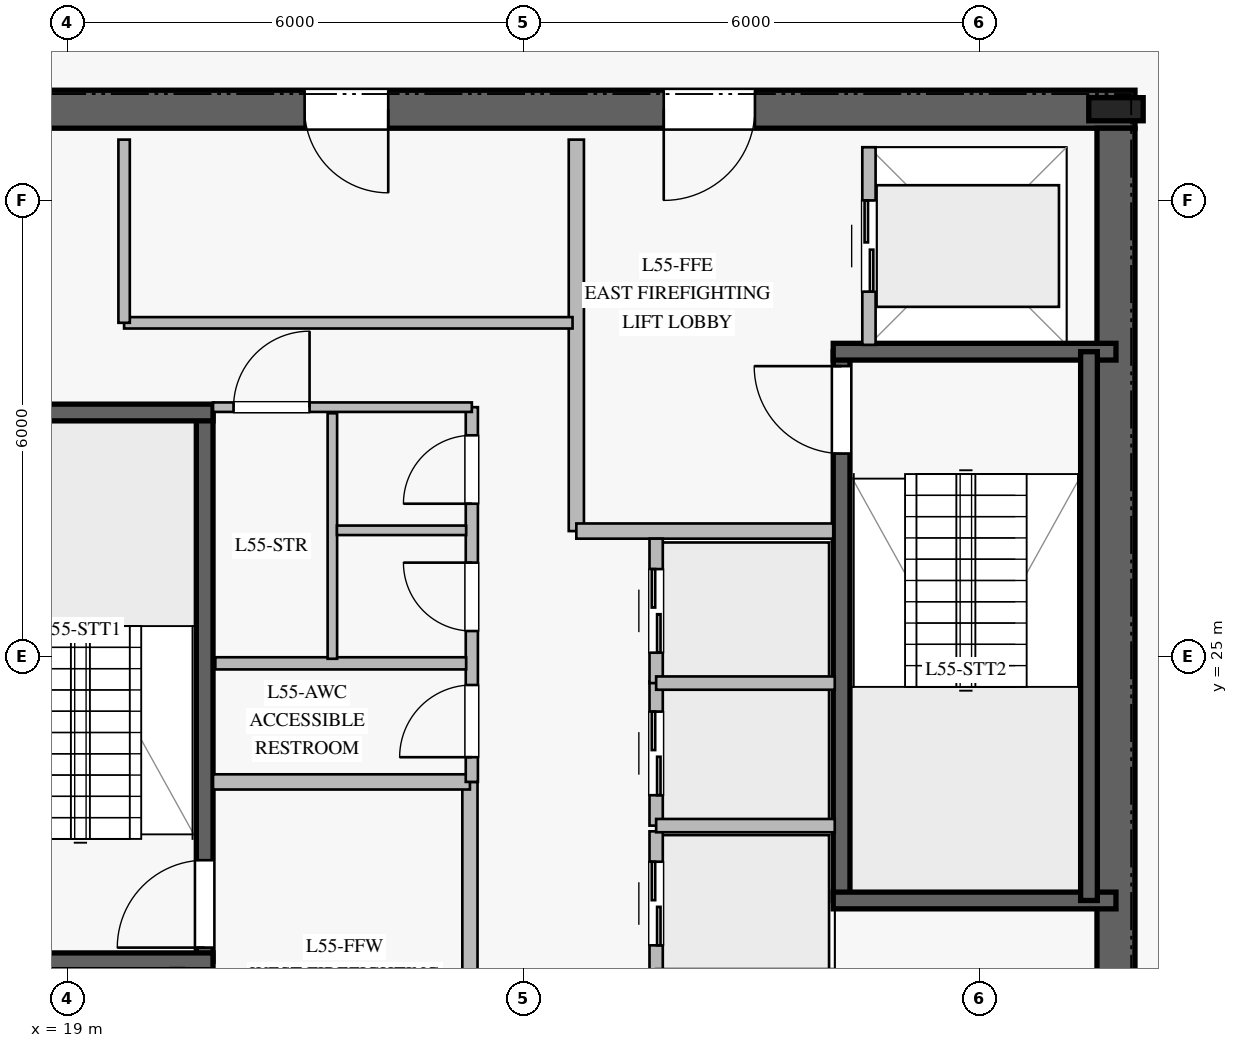
"""IFC4 building model, lengths in metres.
Left out: names, types, materials, properties, quantities, classifications, styles, units other than length and angle.
Written with IfcOpenShell. Run it as: python <this file> out.ifc"""

import sys

from ifc_helpers import new_model, si_unit, direction, frame, frame_2d, origin, origin_2d, place, context, subcontext, project, spatial, rectangle, i_section, extrude, element, fill, save


model = new_model("IFC4")
c1 = context("Model", 3, precision=1e-05, world=origin(), true_north=direction((0.0, 1.0)))
c2 = subcontext(c1, "Body", "Model", "MODEL_VIEW")
j1 = project(units=[si_unit("LENGTHUNIT", "METRE"), si_unit("PLANEANGLEUNIT", "RADIAN")], contexts=[c1])
p1 = place(None, origin())
s1 = spatial("IfcSite", under=j1, at=p1, CompositionType="ELEMENT")
p2 = place(p1, origin())
s2 = spatial("IfcBuilding", under=s1, at=p2, CompositionType="ELEMENT")
p3 = place(p2, frame((0.0, 0.0, 228.8)))
s3 = spatial("IfcBuildingStorey", under=s2, at=p3, CompositionType="ELEMENT", Elevation=228.8)
p4 = place(p3, frame((33.05, 32.2, 0.0), z_axis=(0.0, 0.0, 1.0), x_axis=(-1.0, 0.0, 0.0)))
e1 = element("IfcWall", 1, at=p4, inside=s3, PredefinedType="SHEAR", context=c2, shape_type="SweptSolid", body=[
    extrude(rectangle(XDim=16.1, YDim=0.5, at=frame_2d((8.05, 0.0))), origin(), (0.0, 0.0, 1.0), 3.78),
])
p5 = place(p4, frame((5.0, 0.0, 0.0)))
e2 = element("IfcOpeningElement", 2, at=p5, cuts=e1, PredefinedType="OPENING", context=c2, shape_type="SweptSolid", body=[
    extrude(rectangle(XDim=1.2, YDim=2.25, at=frame_2d((0.6, 1.125))), frame((0.0, 0.26, 0.0), z_axis=(0.0, -1.0, 0.0), x_axis=(1.0, 0.0, 0.0)), (0.0, 0.0, 1.0), 0.52),
])
p6 = place(p4, frame((9.825, 0.0, 0.0)))
e3 = element("IfcOpeningElement", 3, at=p6, cuts=e1, PredefinedType="OPENING", context=c2, shape_type="SweptSolid", body=[
    extrude(rectangle(XDim=1.1, YDim=2.2, at=frame_2d((0.55, 1.1))), frame((0.0, 0.26, 0.0), z_axis=(0.0, -1.0, 0.0), x_axis=(1.0, 0.0, 0.0)), (0.0, 0.0, 1.0), 0.52),
])
p7 = place(p3, frame((32.8, 18.05, 0.0), z_axis=(0.0, 0.0, 1.0), x_axis=(0.0, 1.0, 0.0)))
e4 = element("IfcWall", 4, at=p7, inside=s3, PredefinedType="SHEAR", context=c2, shape_type="SweptSolid", body=[
    extrude(rectangle(XDim=13.9, YDim=0.5, at=frame_2d((6.95, 0.0))), origin(), (0.0, 0.0, 1.0), 3.78),
])
p8 = place(p3, frame((32.8, 32.2, 0.0), z_axis=(0.0, 0.0, 1.0), x_axis=(1.0, 0.0, 0.0)))
e5 = element("IfcColumn", 5, at=p8, inside=s3, PredefinedType="COLUMN", context=c2, shape_type="SweptSolid", body=[
    extrude(i_section(OverallWidth=0.304, OverallDepth=0.716, WebThickness=0.021, FlangeThickness=0.04, at=origin_2d()), origin(), (0.0, 0.0, 1.0), 4.0),
])
p9 = place(p3, frame((20.81, 20.99, 0.0), z_axis=(0.0, 0.0, 1.0), x_axis=(0.0, 1.0, 0.0)))
e6 = element("IfcWall", 6, at=p9, inside=s3, PredefinedType="SOLIDWALL", context=c2, shape_type="SweptSolid", body=[
    extrude(rectangle(XDim=7.22, YDim=0.22, at=frame_2d((3.61, 0.0))), origin(), (0.0, 0.0, 1.0), 3.78),
])
p10 = place(p9, frame((0.18, 0.0, 0.0)))
e7 = element("IfcOpeningElement", 7, at=p10, cuts=e6, PredefinedType="OPENING", context=c2, shape_type="SweptSolid", body=[
    extrude(rectangle(XDim=1.15, YDim=2.2, at=frame_2d((0.575, 1.1))), frame((0.0, 0.12, 0.0), z_axis=(0.0, -1.0, 0.0), x_axis=(1.0, 0.0, 0.0)), (0.0, 0.0, 1.0), 0.24),
])
for number, where, z_axis, x_axis in (
    (8, (17.2, 20.99, 0.0), (0.0, 0.0, 1.0), (1.0, 0.0, 0.0)),
    (9, (17.2, 28.21, 0.0), (0.0, 0.0, 1.0), (1.0, 0.0, 0.0)),
):
    element("IfcWall", number, at=place(p3, frame(where, z_axis=z_axis, x_axis=x_axis)), inside=s3, PredefinedType="SOLIDWALL", context=c2, shape_type="SweptSolid", body=[
        extrude(rectangle(XDim=3.72, YDim=0.22, at=frame_2d((1.86, 0.0))), origin(), (0.0, 0.0, 1.0), 3.78),
    ])
p11 = place(p3, frame((29.19, 21.79, 0.0), z_axis=(0.0, 0.0, 1.0), x_axis=(0.0, 1.0, 0.0)))
e10 = element("IfcWall", 10, at=p11, inside=s3, PredefinedType="SOLIDWALL", context=c2, shape_type="SweptSolid", body=[
    extrude(rectangle(XDim=7.22, YDim=0.22, at=frame_2d((3.61, 0.0))), origin(), (0.0, 0.0, 1.0), 3.78),
])
p12 = place(p11, frame((5.88, 0.0, 0.0)))
e11 = element("IfcOpeningElement", 11, at=p12, cuts=e10, PredefinedType="OPENING", context=c2, shape_type="SweptSolid", body=[
    extrude(rectangle(XDim=1.15, YDim=2.2, at=frame_2d((0.575, 1.1))), frame((0.0, 0.12, 0.0), z_axis=(0.0, -1.0, 0.0), x_axis=(1.0, 0.0, 0.0)), (0.0, 0.0, 1.0), 0.24),
])
for number, where, z_axis, x_axis in (
    (12, (29.08, 21.79, 0.0), (0.0, 0.0, 1.0), (1.0, 0.0, 0.0)),
    (13, (29.08, 29.01, 0.0), (0.0, 0.0, 1.0), (1.0, 0.0, 0.0)),
):
    element("IfcWall", number, at=place(p3, frame(where, z_axis=z_axis, x_axis=x_axis)), inside=s3, PredefinedType="SOLIDWALL", context=c2, shape_type="SweptSolid", body=[
        extrude(rectangle(XDim=3.72, YDim=0.22, at=frame_2d((1.86, 0.0))), origin(), (0.0, 0.0, 1.0), 3.78),
    ])
p13 = place(p3, frame((32.445, 29.01, 0.0), z_axis=(0.0, 0.0, 1.0), x_axis=(0.0, -1.0, 0.0)))
e14 = element("IfcWall", 14, at=p13, inside=s3, PredefinedType="SOLIDWALL", context=c2, shape_type="SweptSolid", body=[
    extrude(rectangle(XDim=7.22, YDim=0.22, at=frame_2d((3.61, 0.0))), origin(), (0.0, 0.0, 1.0), 3.78),
])
p14 = place(p3, frame((24.3, 18.2, 0.0), z_axis=(0.0, 0.0, 1.0), x_axis=(0.0, 1.0, 0.0)))
e15 = element("IfcWall", 15, at=p14, inside=s3, PredefinedType="PARTITIONING", context=c2, shape_type="SweptSolid", body=[
    extrude(rectangle(XDim=5.15, YDim=0.2, at=frame_2d((2.575, 0.0))), origin(), (0.0, 0.0, 1.0), 3.78),
])
p15 = place(p3, frame((20.92, 23.35, 0.0), z_axis=(0.0, 0.0, 1.0), x_axis=(1.0, 0.0, 0.0)))
e16 = element("IfcWall", 16, at=p15, inside=s3, PredefinedType="PARTITIONING", context=c2, shape_type="SweptSolid", body=[
    extrude(rectangle(XDim=3.38, YDim=0.2, at=frame_2d((1.69, 0.0))), origin(), (0.0, 0.0, 1.0), 3.78),
])
p16 = place(p3, frame((25.7, 26.65, 0.0), z_axis=(0.0, 0.0, 1.0), x_axis=(0.0, 1.0, 0.0)))
e17 = element("IfcWall", 17, at=p16, inside=s3, PredefinedType="PARTITIONING", context=c2, shape_type="SweptSolid", body=[
    extrude(rectangle(XDim=5.15, YDim=0.2, at=frame_2d((2.575, 0.0))), origin(), (0.0, 0.0, 1.0), 3.78),
])
p17 = place(p3, frame((25.7, 26.65, 0.0), z_axis=(0.0, 0.0, 1.0), x_axis=(1.0, 0.0, 0.0)))
e18 = element("IfcWall", 18, at=p17, inside=s3, PredefinedType="PARTITIONING", context=c2, shape_type="SweptSolid", body=[
    extrude(rectangle(XDim=3.38, YDim=0.2, at=frame_2d((1.69, 0.0))), origin(), (0.0, 0.0, 1.0), 3.78),
])
p18 = place(p3, frame((24.325, 23.35, 0.0), z_axis=(0.0, 0.0, 1.0), x_axis=(0.0, 1.0, 0.0)))
e19 = element("IfcWall", 19, at=p18, inside=s3, PredefinedType="PLUMBINGWALL", context=c2, shape_type="SweptSolid", body=[
    extrude(rectangle(XDim=4.93, YDim=0.16, at=frame_2d((2.465, 0.0))), origin(), (0.0, 0.0, 1.0), 3.78),
])
p19 = place(p18, frame((0.325, 0.0, 0.0)))
e20 = element("IfcOpeningElement", 20, at=p19, cuts=e19, PredefinedType="OPENING", context=c2, shape_type="SweptSolid", body=[
    extrude(rectangle(XDim=0.95, YDim=2.1, at=frame_2d((0.475, 1.05))), frame((0.0, 0.09, 0.0), z_axis=(0.0, -1.0, 0.0), x_axis=(1.0, 0.0, 0.0)), (0.0, 0.0, 1.0), 0.18),
])
p20 = place(p18, frame((1.985, 0.0, 0.0)))
e21 = element("IfcOpeningElement", 21, at=p20, cuts=e19, PredefinedType="OPENING", context=c2, shape_type="SweptSolid", body=[
    extrude(rectangle(XDim=0.9, YDim=2.1, at=frame_2d((0.45, 1.05))), frame((0.0, 0.09, 0.0), z_axis=(0.0, -1.0, 0.0), x_axis=(1.0, 0.0, 0.0)), (0.0, 0.0, 1.0), 0.18),
])
p21 = place(p18, frame((3.66, 0.0, 0.0)))
e22 = element("IfcOpeningElement", 22, at=p21, cuts=e19, PredefinedType="OPENING", context=c2, shape_type="SweptSolid", body=[
    extrude(rectangle(XDim=0.9, YDim=2.1, at=frame_2d((0.45, 1.05))), frame((0.0, 0.09, 0.0), z_axis=(0.0, -1.0, 0.0), x_axis=(1.0, 0.0, 0.0)), (0.0, 0.0, 1.0), 0.18),
])
p22 = place(p3, frame((20.92, 28.28, 0.0), z_axis=(0.0, 0.0, 1.0), x_axis=(1.0, 0.0, 0.0)))
e23 = element("IfcWall", 23, at=p22, inside=s3, PredefinedType="PARTITIONING", context=c2, shape_type="SweptSolid", body=[
    extrude(rectangle(XDim=3.405, YDim=0.125, at=frame_2d((1.703, 0.0))), origin(), (0.0, 0.0, 1.0), 3.78),
])
p23 = place(p22, frame((0.27, 0.0, 0.0)))
e24 = element("IfcOpeningElement", 24, at=p23, cuts=e23, PredefinedType="OPENING", context=c2, shape_type="SweptSolid", body=[
    extrude(rectangle(XDim=1.0, YDim=2.15, at=frame_2d((0.5, 1.075))), frame((0.0, 0.073, 0.0), z_axis=(0.0, -1.0, 0.0), x_axis=(1.0, 0.0, 0.0)), (0.0, 0.0, 1.0), 0.145),
])
p24 = place(p3, frame((20.95, 24.91, 0.0), z_axis=(0.0, 0.0, 1.0), x_axis=(1.0, 0.0, 0.0)))
e25 = element("IfcWall", 25, at=p24, inside=s3, PredefinedType="PLUMBINGWALL", context=c2, shape_type="SweptSolid", body=[
    extrude(rectangle(XDim=3.3, YDim=0.16, at=frame_2d((1.65, 0.0))), origin(), (0.0, 0.0, 1.0), 3.78),
])
p25 = place(p3, frame((22.49, 24.97, 0.0), z_axis=(0.0, 0.0, 1.0), x_axis=(0.0, 1.0, 0.0)))
e26 = element("IfcWall", 26, at=p25, inside=s3, PredefinedType="PARTITIONING", context=c2, shape_type="SweptSolid", body=[
    extrude(rectangle(XDim=3.23, YDim=0.125, at=frame_2d((1.615, 0.0))), origin(), (0.0, 0.0, 1.0), 3.78),
])
p26 = place(p3, frame((22.55, 26.66, 0.0), z_axis=(0.0, 0.0, 1.0), x_axis=(1.0, 0.0, 0.0)))
e27 = element("IfcWall", 27, at=p26, inside=s3, PredefinedType="PARTITIONING", context=c2, shape_type="SweptSolid", body=[
    extrude(rectangle(XDim=1.7, YDim=0.125, at=frame_2d((0.85, 0.0))), origin(), (0.0, 0.0, 1.0), 3.78),
])
p27 = place(p3, frame((19.75, 29.39, 0.0), z_axis=(0.0, 0.0, 1.0), x_axis=(1.0, 0.0, 0.0)))
e28 = element("IfcWall", 28, at=p27, inside=s3, PredefinedType="PARTITIONING", context=c2, shape_type="SweptSolid", body=[
    extrude(rectangle(XDim=5.9, YDim=0.15, at=frame_2d((2.95, 0.0))), origin(), (0.0, 0.0, 1.0), 3.78),
])
p28 = place(p3, frame((19.75, 29.39, 0.0), z_axis=(0.0, 0.0, 1.0), x_axis=(0.0, 1.0, 0.0)))
e29 = element("IfcWall", 29, at=p28, inside=s3, PredefinedType="PARTITIONING", context=c2, shape_type="SweptSolid", body=[
    extrude(rectangle(XDim=2.41, YDim=0.15, at=frame_2d((1.205, 0.0))), origin(), (0.0, 0.0, 1.0), 3.78),
])
p29 = place(p3, frame((26.75, 20.8, 0.0), z_axis=(0.0, 0.0, 1.0), x_axis=(0.0, 1.0, 0.0)))
e30 = element("IfcWall", 30, at=p29, inside=s3, PredefinedType="PARTITIONING", context=c2, shape_type="SweptSolid", body=[
    extrude(rectangle(XDim=1.9, YDim=0.175, at=frame_2d((0.95, 0.0))), origin(), (0.0, 0.0, 1.0), 3.78),
])
p30 = place(p29, frame((0.4, 0.0, 0.0)))
e31 = element("IfcOpeningElement", 31, at=p30, cuts=e30, PredefinedType="OPENING", context=c2, shape_type="SweptSolid", body=[
    extrude(rectangle(XDim=1.1, YDim=2.2, at=frame_2d((0.55, 1.1))), frame((0.0, 0.098, 0.0), z_axis=(0.0, -1.0, 0.0), x_axis=(1.0, 0.0, 0.0)), (0.0, 0.0, 1.0), 0.195),
])
p31 = place(p3, frame((26.75, 22.775, 0.0), z_axis=(0.0, 0.0, 1.0), x_axis=(0.0, 1.0, 0.0)))
e32 = element("IfcWall", 32, at=p31, inside=s3, PredefinedType="PARTITIONING", context=c2, shape_type="SweptSolid", body=[
    extrude(rectangle(XDim=1.9, YDim=0.175, at=frame_2d((0.95, 0.0))), origin(), (0.0, 0.0, 1.0), 3.78),
])
p32 = place(p31, frame((0.4, 0.0, 0.0)))
e33 = element("IfcOpeningElement", 33, at=p32, cuts=e32, PredefinedType="OPENING", context=c2, shape_type="SweptSolid", body=[
    extrude(rectangle(XDim=1.1, YDim=2.2, at=frame_2d((0.55, 1.1))), frame((0.0, 0.098, 0.0), z_axis=(0.0, -1.0, 0.0), x_axis=(1.0, 0.0, 0.0)), (0.0, 0.0, 1.0), 0.195),
])
p33 = place(p3, frame((26.75, 22.775, 0.0), z_axis=(0.0, 0.0, 1.0), x_axis=(1.0, 0.0, 0.0)))
e34 = element("IfcWall", 34, at=p33, inside=s3, PredefinedType="PARTITIONING", context=c2, shape_type="SweptSolid", body=[
    extrude(rectangle(XDim=2.35, YDim=0.175, at=frame_2d((1.175, 0.0))), origin(), (0.0, 0.0, 1.0), 3.78),
])
p34 = place(p3, frame((26.75, 24.65, 0.0), z_axis=(0.0, 0.0, 1.0), x_axis=(0.0, 1.0, 0.0)))
e35 = element("IfcWall", 35, at=p34, inside=s3, PredefinedType="PARTITIONING", context=c2, shape_type="SweptSolid", body=[
    extrude(rectangle(XDim=1.9, YDim=0.175, at=frame_2d((0.95, 0.0))), origin(), (0.0, 0.0, 1.0), 3.78),
])
p35 = place(p34, frame((0.4, 0.0, 0.0)))
e36 = element("IfcOpeningElement", 36, at=p35, cuts=e35, PredefinedType="OPENING", context=c2, shape_type="SweptSolid", body=[
    extrude(rectangle(XDim=1.1, YDim=2.2, at=frame_2d((0.55, 1.1))), frame((0.0, 0.098, 0.0), z_axis=(0.0, -1.0, 0.0), x_axis=(1.0, 0.0, 0.0)), (0.0, 0.0, 1.0), 0.195),
])
p36 = place(p3, frame((26.75, 24.65, 0.0), z_axis=(0.0, 0.0, 1.0), x_axis=(1.0, 0.0, 0.0)))
e37 = element("IfcWall", 37, at=p36, inside=s3, PredefinedType="PARTITIONING", context=c2, shape_type="SweptSolid", body=[
    extrude(rectangle(XDim=2.35, YDim=0.175, at=frame_2d((1.175, 0.0))), origin(), (0.0, 0.0, 1.0), 3.78),
])
p37 = place(p3, frame((29.55, 29.1, 0.0), z_axis=(0.0, 0.0, 1.0), x_axis=(0.0, 1.0, 0.0)))
e38 = element("IfcWall", 38, at=p37, inside=s3, PredefinedType="PARTITIONING", context=c2, shape_type="SweptSolid", body=[
    extrude(rectangle(XDim=2.6, YDim=0.175, at=frame_2d((1.3, 0.0))), origin(), (0.0, 0.0, 1.0), 3.78),
])
p38 = place(p37, frame((0.7, 0.0, 0.0)))
e39 = element("IfcOpeningElement", 39, at=p38, cuts=e38, PredefinedType="OPENING", context=c2, shape_type="SweptSolid", body=[
    extrude(rectangle(XDim=1.2, YDim=2.2, at=frame_2d((0.6, 1.1))), frame((0.0, 0.098, 0.0), z_axis=(0.0, -1.0, 0.0), x_axis=(1.0, 0.0, 0.0)), (0.0, 0.0, 1.0), 0.195),
])
p39 = place(p10, origin())
e40 = element("IfcDoor", 40, at=p39, inside=s3, OperationType="SINGLE_SWING_LEFT", PredefinedType="DOOR", context=c2, shape_type="SweptSolid", body=[
    extrude(rectangle(XDim=1.15, YDim=2.2, at=frame_2d((0.575, 1.1))), frame((0.0, 0.025, 0.0), z_axis=(0.0, -1.0, 0.0), x_axis=(1.0, 0.0, 0.0)), (0.0, 0.0, 1.0), 0.05),
])
fill(e7, e40)
p40 = place(p12, origin())
e41 = element("IfcDoor", 41, at=p40, inside=s3, OperationType="SINGLE_SWING_RIGHT", PredefinedType="DOOR", context=c2, shape_type="SweptSolid", body=[
    extrude(rectangle(XDim=1.15, YDim=2.2, at=frame_2d((0.575, 1.1))), frame((0.0, 0.025, 0.0), z_axis=(0.0, -1.0, 0.0), x_axis=(1.0, 0.0, 0.0)), (0.0, 0.0, 1.0), 0.05),
])
fill(e11, e41)
p41 = place(p5, origin())
e42 = element("IfcDoor", 42, at=p41, inside=s3, OperationType="SINGLE_SWING_RIGHT", PredefinedType="DOOR", context=c2, shape_type="SweptSolid", body=[
    extrude(rectangle(XDim=1.2, YDim=2.25, at=frame_2d((0.6, 1.125))), frame((0.0, 0.025, 0.0), z_axis=(0.0, -1.0, 0.0), x_axis=(1.0, 0.0, 0.0)), (0.0, 0.0, 1.0), 0.05),
])
fill(e2, e42)
p42 = place(p19, origin())
e43 = element("IfcDoor", 43, at=p42, inside=s3, OperationType="SINGLE_SWING_LEFT", PredefinedType="DOOR", context=c2, shape_type="SweptSolid", body=[
    extrude(rectangle(XDim=0.95, YDim=2.1, at=frame_2d((0.475, 1.05))), frame((0.0, 0.025, 0.0), z_axis=(0.0, -1.0, 0.0), x_axis=(1.0, 0.0, 0.0)), (0.0, 0.0, 1.0), 0.05),
])
fill(e20, e43)
p43 = place(p20, origin())
e44 = element("IfcDoor", 44, at=p43, inside=s3, OperationType="SINGLE_SWING_RIGHT", PredefinedType="DOOR", context=c2, shape_type="SweptSolid", body=[
    extrude(rectangle(XDim=0.9, YDim=2.1, at=frame_2d((0.45, 1.05))), frame((0.0, 0.025, 0.0), z_axis=(0.0, -1.0, 0.0), x_axis=(1.0, 0.0, 0.0)), (0.0, 0.0, 1.0), 0.05),
])
fill(e21, e44)
p44 = place(p21, origin())
e45 = element("IfcDoor", 45, at=p44, inside=s3, OperationType="SINGLE_SWING_LEFT", PredefinedType="DOOR", context=c2, shape_type="SweptSolid", body=[
    extrude(rectangle(XDim=0.9, YDim=2.1, at=frame_2d((0.45, 1.05))), frame((0.0, 0.025, 0.0), z_axis=(0.0, -1.0, 0.0), x_axis=(1.0, 0.0, 0.0)), (0.0, 0.0, 1.0), 0.05),
])
fill(e22, e45)
p45 = place(p23, origin())
e46 = element("IfcDoor", 46, at=p45, inside=s3, OperationType="SINGLE_SWING_RIGHT", PredefinedType="DOOR", context=c2, shape_type="SweptSolid", body=[
    extrude(rectangle(XDim=1.0, YDim=2.15, at=frame_2d((0.5, 1.075))), frame((0.0, 0.025, 0.0), z_axis=(0.0, -1.0, 0.0), x_axis=(1.0, 0.0, 0.0)), (0.0, 0.0, 1.0), 0.05),
])
fill(e24, e46)
p46 = place(p6, origin())
e47 = element("IfcDoor", 47, at=p46, inside=s3, OperationType="SINGLE_SWING_LEFT", PredefinedType="DOOR", context=c2, shape_type="SweptSolid", body=[
    extrude(rectangle(XDim=1.1, YDim=2.2, at=frame_2d((0.55, 1.1))), frame((0.0, 0.025, 0.0), z_axis=(0.0, -1.0, 0.0), x_axis=(1.0, 0.0, 0.0)), (0.0, 0.0, 1.0), 0.05),
])
fill(e3, e47)
p47 = place(p30, origin())
e48 = element("IfcDoor", 48, at=p47, inside=s3, OperationType="DOUBLE_DOOR_SLIDING", PredefinedType="DOOR", context=c2, shape_type="SweptSolid", body=[
    extrude(rectangle(XDim=1.1, YDim=2.2, at=frame_2d((0.55, 1.1))), frame((0.0, 0.025, 0.0), z_axis=(0.0, -1.0, 0.0), x_axis=(1.0, 0.0, 0.0)), (0.0, 0.0, 1.0), 0.05),
])
fill(e31, e48)
p48 = place(p32, origin())
e49 = element("IfcDoor", 49, at=p48, inside=s3, OperationType="DOUBLE_DOOR_SLIDING", PredefinedType="DOOR", context=c2, shape_type="SweptSolid", body=[
    extrude(rectangle(XDim=1.1, YDim=2.2, at=frame_2d((0.55, 1.1))), frame((0.0, 0.025, 0.0), z_axis=(0.0, -1.0, 0.0), x_axis=(1.0, 0.0, 0.0)), (0.0, 0.0, 1.0), 0.05),
])
fill(e33, e49)
p49 = place(p35, origin())
e50 = element("IfcDoor", 50, at=p49, inside=s3, OperationType="DOUBLE_DOOR_SLIDING", PredefinedType="DOOR", context=c2, shape_type="SweptSolid", body=[
    extrude(rectangle(XDim=1.1, YDim=2.2, at=frame_2d((0.55, 1.1))), frame((0.0, 0.025, 0.0), z_axis=(0.0, -1.0, 0.0), x_axis=(1.0, 0.0, 0.0)), (0.0, 0.0, 1.0), 0.05),
])
fill(e36, e50)
p50 = place(p38, origin())
e51 = element("IfcDoor", 51, at=p50, inside=s3, OperationType="DOUBLE_DOOR_SLIDING", PredefinedType="DOOR", context=c2, shape_type="SweptSolid", body=[
    extrude(rectangle(XDim=1.2, YDim=2.2, at=frame_2d((0.6, 1.1))), frame((0.0, 0.025, 0.0), z_axis=(0.0, -1.0, 0.0), x_axis=(1.0, 0.0, 0.0)), (0.0, 0.0, 1.0), 0.05),
])
fill(e39, e51)
save(model, sys.argv[1])
